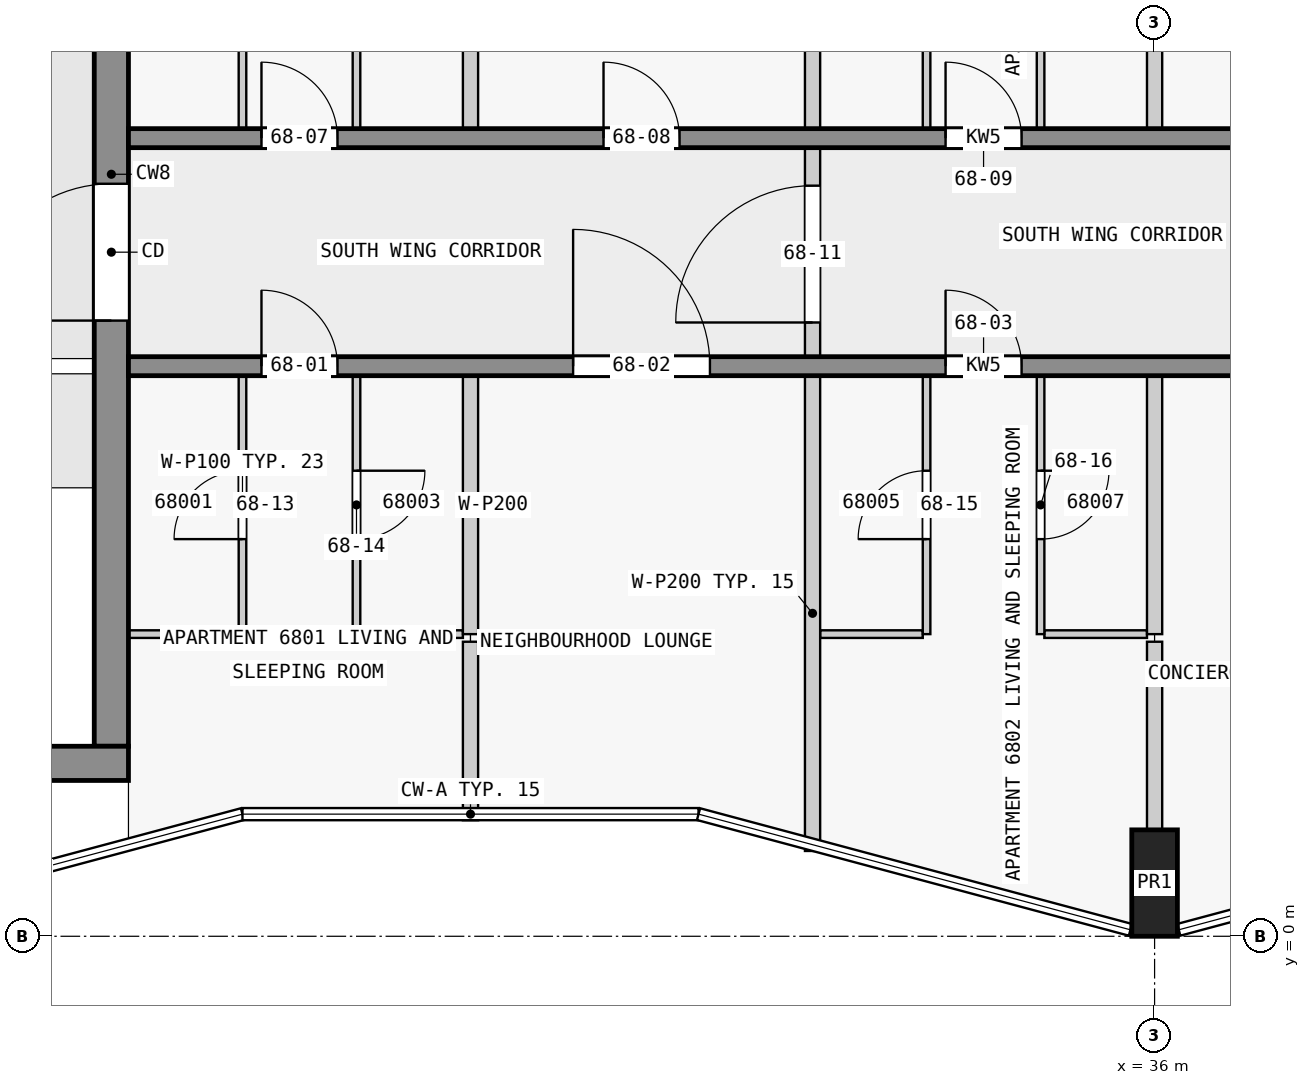
"""IFC4 building model, lengths in metres.
Left out: names, types, materials, properties, quantities, classifications, styles, units other than length and angle.
Written with IfcOpenShell. Run it as: python <this file> out.ifc"""

import sys

from ifc_helpers import new_model, si_unit, direction, frame, frame_2d, origin, origin_2d, place, context, subcontext, project, spatial, rectangle, extrude, element, fill, save


model = new_model("IFC4")
c1 = context("Model", 3, precision=1e-05, world=origin(), true_north=direction((0.0, 1.0)))
c2 = subcontext(c1, "Body", "Model", "MODEL_VIEW")
j1 = project(units=[si_unit("LENGTHUNIT", "METRE"), si_unit("PLANEANGLEUNIT", "RADIAN")], contexts=[c1])
p1 = place(None, origin())
s1 = spatial("IfcSite", under=j1, at=p1, CompositionType="ELEMENT")
p2 = place(p1, origin())
s2 = spatial("IfcBuilding", under=s1, at=p2, CompositionType="ELEMENT")
p3 = place(p2, frame((0.0, 0.0, 259.9)))
s3 = spatial("IfcBuildingStorey", under=s2, at=p3, CompositionType="ELEMENT", Elevation=259.9)
p4 = place(p3, frame((36.0, 0.7, 0.0), z_axis=(0.0, 0.0, 1.0), x_axis=(1.0, 0.0, 0.0)))
e1 = element("IfcColumn", 1, at=p4, inside=s3, PredefinedType="COLUMN", context=c2, shape_type="SweptSolid", body=[
    extrude(rectangle(XDim=0.6, YDim=1.4, at=origin_2d()), origin(), (0.0, 0.0, 1.0), 3.5),
])
p5 = place(p3, frame((1.85, 2.275, 0.0), z_axis=(0.0, 0.0, 1.0), x_axis=(1.0, 0.0, 0.0)))
e2 = element("IfcWall", 2, at=p5, inside=s3, PredefinedType="SHEAR", context=c2, shape_type="SweptSolid", body=[
    extrude(rectangle(XDim=20.65, YDim=0.45, at=frame_2d((10.325, 0.0))), origin(), (0.0, 0.0, 1.0), 3.25),
])
p6 = place(p3, frame((22.275, 2.5, 0.0), z_axis=(0.0, 0.0, 1.0), x_axis=(0.0, 1.0, 0.0)))
e3 = element("IfcWall", 3, at=p6, inside=s3, PredefinedType="SHEAR", context=c2, shape_type="SweptSolid", body=[
    extrude(rectangle(XDim=15.05, YDim=0.45, at=frame_2d((7.525, 0.0))), origin(), (0.0, 0.0, 1.0), 3.25),
])
p7 = place(p6, frame((5.6, 0.0, 0.0)))
e4 = element("IfcOpeningElement", 4, at=p7, cuts=e3, PredefinedType="OPENING", context=c2, shape_type="SweptSolid", body=[
    extrude(rectangle(XDim=1.8, YDim=2.1, at=frame_2d((0.9, 1.05))), frame((0.0, 0.235, 0.0), z_axis=(0.0, -1.0, 0.0), x_axis=(1.0, 0.0, 0.0)), (0.0, 0.0, 1.0), 0.47),
])
p8 = place(p3, frame((22.5, 7.5, 0.0), z_axis=(0.0, 0.0, 1.0), x_axis=(1.0, 0.0, 0.0)))
e5 = element("IfcWall", 5, at=p8, inside=s3, PredefinedType="SHEAR", context=c2, shape_type="SweptSolid", body=[
    extrude(rectangle(XDim=22.5, YDim=0.25, at=frame_2d((11.25, 0.0))), origin(), (0.0, 0.0, 1.0), 3.25),
])
p9 = place(p8, frame((1.75, 0.0, 0.0)))
e6 = element("IfcOpeningElement", 6, at=p9, cuts=e5, PredefinedType="OPENING", context=c2, shape_type="SweptSolid", body=[
    extrude(rectangle(XDim=1.0, YDim=2.1, at=frame_2d((0.5, 1.05))), frame((0.0, 0.135, 0.0), z_axis=(0.0, -1.0, 0.0), x_axis=(1.0, 0.0, 0.0)), (0.0, 0.0, 1.0), 0.27),
])
p10 = place(p8, frame((5.85, 0.0, 0.0)))
e7 = element("IfcOpeningElement", 7, at=p10, cuts=e5, PredefinedType="OPENING", context=c2, shape_type="SweptSolid", body=[
    extrude(rectangle(XDim=1.8, YDim=2.1, at=frame_2d((0.9, 1.05))), frame((0.0, 0.135, 0.0), z_axis=(0.0, -1.0, 0.0), x_axis=(1.0, 0.0, 0.0)), (0.0, 0.0, 1.0), 0.27),
])
p11 = place(p8, frame((10.75, 0.0, 0.0)))
e8 = element("IfcOpeningElement", 8, at=p11, cuts=e5, PredefinedType="OPENING", context=c2, shape_type="SweptSolid", body=[
    extrude(rectangle(XDim=1.0, YDim=2.1, at=frame_2d((0.5, 1.05))), frame((0.0, 0.135, 0.0), z_axis=(0.0, -1.0, 0.0), x_axis=(1.0, 0.0, 0.0)), (0.0, 0.0, 1.0), 0.27),
])
p12 = place(p8, frame((15.25, 0.0, 0.0)))
e9 = element("IfcOpeningElement", 9, at=p12, cuts=e5, PredefinedType="OPENING", context=c2, shape_type="SweptSolid", body=[
    extrude(rectangle(XDim=1.0, YDim=2.1, at=frame_2d((0.5, 1.05))), frame((0.0, 0.135, 0.0), z_axis=(0.0, -1.0, 0.0), x_axis=(1.0, 0.0, 0.0)), (0.0, 0.0, 1.0), 0.27),
])
p13 = place(p8, frame((18.75, 0.0, 0.0)))
e10 = element("IfcOpeningElement", 10, at=p13, cuts=e5, PredefinedType="OPENING", context=c2, shape_type="SweptSolid", body=[
    extrude(rectangle(XDim=0.9, YDim=2.1, at=frame_2d((0.45, 1.05))), frame((0.0, 0.135, 0.0), z_axis=(0.0, -1.0, 0.0), x_axis=(1.0, 0.0, 0.0)), (0.0, 0.0, 1.0), 0.27),
])
p14 = place(p8, frame((20.95, 0.0, 0.0)))
e11 = element("IfcOpeningElement", 11, at=p14, cuts=e5, PredefinedType="OPENING", context=c2, shape_type="SweptSolid", body=[
    extrude(rectangle(XDim=1.0, YDim=2.1, at=frame_2d((0.5, 1.05))), frame((0.0, 0.135, 0.0), z_axis=(0.0, -1.0, 0.0), x_axis=(1.0, 0.0, 0.0)), (0.0, 0.0, 1.0), 0.27),
])
p15 = place(p3, frame((22.5, 10.5, 0.0), z_axis=(0.0, 0.0, 1.0), x_axis=(1.0, 0.0, 0.0)))
e12 = element("IfcWall", 12, at=p15, inside=s3, PredefinedType="SHEAR", context=c2, shape_type="SweptSolid", body=[
    extrude(rectangle(XDim=22.5, YDim=0.25, at=frame_2d((11.25, 0.0))), origin(), (0.0, 0.0, 1.0), 3.25),
])
p16 = place(p15, frame((1.75, 0.0, 0.0)))
e13 = element("IfcOpeningElement", 13, at=p16, cuts=e12, PredefinedType="OPENING", context=c2, shape_type="SweptSolid", body=[
    extrude(rectangle(XDim=1.0, YDim=2.1, at=frame_2d((0.5, 1.05))), frame((0.0, 0.135, 0.0), z_axis=(0.0, -1.0, 0.0), x_axis=(1.0, 0.0, 0.0)), (0.0, 0.0, 1.0), 0.27),
])
p17 = place(p15, frame((6.25, 0.0, 0.0)))
e14 = element("IfcOpeningElement", 14, at=p17, cuts=e12, PredefinedType="OPENING", context=c2, shape_type="SweptSolid", body=[
    extrude(rectangle(XDim=1.0, YDim=2.1, at=frame_2d((0.5, 1.05))), frame((0.0, 0.135, 0.0), z_axis=(0.0, -1.0, 0.0), x_axis=(1.0, 0.0, 0.0)), (0.0, 0.0, 1.0), 0.27),
])
p18 = place(p15, frame((10.75, 0.0, 0.0)))
e15 = element("IfcOpeningElement", 15, at=p18, cuts=e12, PredefinedType="OPENING", context=c2, shape_type="SweptSolid", body=[
    extrude(rectangle(XDim=1.0, YDim=2.1, at=frame_2d((0.5, 1.05))), frame((0.0, 0.135, 0.0), z_axis=(0.0, -1.0, 0.0), x_axis=(1.0, 0.0, 0.0)), (0.0, 0.0, 1.0), 0.27),
])
p19 = place(p15, frame((16.85, 0.0, 0.0)))
e16 = element("IfcOpeningElement", 16, at=p19, cuts=e12, PredefinedType="OPENING", context=c2, shape_type="SweptSolid", body=[
    extrude(rectangle(XDim=1.0, YDim=2.1, at=frame_2d((0.5, 1.05))), frame((0.0, 0.135, 0.0), z_axis=(0.0, -1.0, 0.0), x_axis=(1.0, 0.0, 0.0)), (0.0, 0.0, 1.0), 0.27),
])
p20 = place(p3, frame((22.5, 3.975, 0.0), z_axis=(0.0, 0.0, 1.0), x_axis=(1.0, 0.0, 0.0)))
e17 = element("IfcWall", 17, at=p20, inside=s3, PredefinedType="PARTITIONING", context=c2, shape_type="SweptSolid", body=[
    extrude(rectangle(XDim=1.45, YDim=0.1, at=frame_2d((0.725, 0.0))), origin(), (0.0, 0.0, 1.0), 3.25),
])
for number, where, z_axis, x_axis in (
    (18, (25.55, 3.975, 0.0), (0.0, 0.0, 1.0), (1.0, 0.0, 0.0)),
    (19, (31.6, 3.975, 0.0), (0.0, 0.0, 1.0), (1.0, 0.0, 0.0)),
    (20, (34.55, 3.975, 0.0), (0.0, 0.0, 1.0), (1.0, 0.0, 0.0)),
):
    element("IfcWall", number, at=place(p3, frame(where, z_axis=z_axis, x_axis=x_axis)), inside=s3, PredefinedType="PARTITIONING", context=c2, shape_type="SweptSolid", body=[
        extrude(rectangle(XDim=1.35, YDim=0.1, at=frame_2d((0.675, 0.0))), origin(), (0.0, 0.0, 1.0), 3.25),
    ])
p21 = place(p3, frame((24.0, 3.975, 0.0), z_axis=(0.0, 0.0, 1.0), x_axis=(0.0, 1.0, 0.0)))
e21 = element("IfcWall", 21, at=p21, inside=s3, PredefinedType="PARTITIONING", context=c2, shape_type="SweptSolid", body=[
    extrude(rectangle(XDim=3.4, YDim=0.1, at=frame_2d((1.7, 0.0))), origin(), (0.0, 0.0, 1.0), 3.25),
])
p22 = place(p21, frame((1.25, 0.0, 0.0)))
e22 = element("IfcOpeningElement", 22, at=p22, cuts=e21, PredefinedType="OPENING", context=c2, shape_type="SweptSolid", body=[
    extrude(rectangle(XDim=0.9, YDim=2.1, at=frame_2d((0.45, 1.05))), frame((0.0, 0.06, 0.0), z_axis=(0.0, -1.0, 0.0), x_axis=(1.0, 0.0, 0.0)), (0.0, 0.0, 1.0), 0.12),
])
p23 = place(p3, frame((24.0, 10.625, 0.0), z_axis=(0.0, 0.0, 1.0), x_axis=(0.0, 1.0, 0.0)))
e23 = element("IfcWall", 23, at=p23, inside=s3, PredefinedType="PARTITIONING", context=c2, shape_type="SweptSolid", body=[
    extrude(rectangle(XDim=3.4, YDim=0.1, at=frame_2d((1.7, 0.0))), origin(), (0.0, 0.0, 1.0), 3.25),
])
p24 = place(p23, frame((1.25, 0.0, 0.0)))
e24 = element("IfcOpeningElement", 24, at=p24, cuts=e23, PredefinedType="OPENING", context=c2, shape_type="SweptSolid", body=[
    extrude(rectangle(XDim=0.9, YDim=2.1, at=frame_2d((0.45, 1.05))), frame((0.0, 0.06, 0.0), z_axis=(0.0, -1.0, 0.0), x_axis=(1.0, 0.0, 0.0)), (0.0, 0.0, 1.0), 0.12),
])
p25 = place(p3, frame((25.5, 7.375, 0.0), z_axis=(0.0, 0.0, 1.0), x_axis=(0.0, -1.0, 0.0)))
e25 = element("IfcWall", 25, at=p25, inside=s3, PredefinedType="PARTITIONING", context=c2, shape_type="SweptSolid", body=[
    extrude(rectangle(XDim=3.4, YDim=0.1, at=frame_2d((1.7, 0.0))), origin(), (0.0, 0.0, 1.0), 3.25),
])
p26 = place(p25, frame((1.25, 0.0, 0.0)))
e26 = element("IfcOpeningElement", 26, at=p26, cuts=e25, PredefinedType="OPENING", context=c2, shape_type="SweptSolid", body=[
    extrude(rectangle(XDim=0.9, YDim=2.1, at=frame_2d((0.45, 1.05))), frame((0.0, 0.06, 0.0), z_axis=(0.0, -1.0, 0.0), x_axis=(1.0, 0.0, 0.0)), (0.0, 0.0, 1.0), 0.12),
])
p27 = place(p3, frame((25.5, 14.025, 0.0), z_axis=(0.0, 0.0, 1.0), x_axis=(0.0, -1.0, 0.0)))
e27 = element("IfcWall", 27, at=p27, inside=s3, PredefinedType="PARTITIONING", context=c2, shape_type="SweptSolid", body=[
    extrude(rectangle(XDim=3.4, YDim=0.1, at=frame_2d((1.7, 0.0))), origin(), (0.0, 0.0, 1.0), 3.25),
])
p28 = place(p27, frame((1.25, 0.0, 0.0)))
e28 = element("IfcOpeningElement", 28, at=p28, cuts=e27, PredefinedType="OPENING", context=c2, shape_type="SweptSolid", body=[
    extrude(rectangle(XDim=0.9, YDim=2.1, at=frame_2d((0.45, 1.05))), frame((0.0, 0.06, 0.0), z_axis=(0.0, -1.0, 0.0), x_axis=(1.0, 0.0, 0.0)), (0.0, 0.0, 1.0), 0.12),
])
p29 = place(p3, frame((27.0, 3.875, 0.0), z_axis=(0.0, 0.0, 1.0), x_axis=(0.0, -1.0, 0.0)))
e29 = element("IfcWall", 29, at=p29, inside=s3, PredefinedType="PARTITIONING", context=c2, shape_type="SweptSolid", body=[
    extrude(rectangle(XDim=2.348, YDim=0.2, at=frame_2d((1.174, 0.0))), origin(), (0.0, 0.0, 1.0), 3.25),
])
for number, where, z_axis, x_axis in (
    (30, (27.0, 3.975, 0.0), (0.0, 0.0, 1.0), (0.0, 1.0, 0.0)),
    (31, (27.0, 10.625, 0.0), (0.0, 0.0, 1.0), (0.0, 1.0, 0.0)),
):
    element("IfcWall", number, at=place(p3, frame(where, z_axis=z_axis, x_axis=x_axis)), inside=s3, PredefinedType="PARTITIONING", context=c2, shape_type="SweptSolid", body=[
        extrude(rectangle(XDim=3.4, YDim=0.2, at=frame_2d((1.7, 0.0))), origin(), (0.0, 0.0, 1.0), 3.25),
    ])
for number, where, z_axis, x_axis in (
    (32, (31.5, 1.122, 0.0), (0.0, 0.0, 1.0), (0.0, 1.0, 0.0)),
    (33, (31.5, 10.625, 0.0), (0.0, 0.0, 1.0), (0.0, 1.0, 0.0)),
):
    element("IfcWall", number, at=place(p3, frame(where, z_axis=z_axis, x_axis=x_axis)), inside=s3, PredefinedType="PARTITIONING", context=c2, shape_type="SweptSolid", body=[
        extrude(rectangle(XDim=6.253, YDim=0.2, at=frame_2d((3.126, 0.0))), origin(), (0.0, 0.0, 1.0), 3.25),
    ])
p30 = place(p3, frame((33.0, 3.975, 0.0), z_axis=(0.0, 0.0, 1.0), x_axis=(0.0, 1.0, 0.0)))
e34 = element("IfcWall", 34, at=p30, inside=s3, PredefinedType="PARTITIONING", context=c2, shape_type="SweptSolid", body=[
    extrude(rectangle(XDim=3.4, YDim=0.1, at=frame_2d((1.7, 0.0))), origin(), (0.0, 0.0, 1.0), 3.25),
])
p31 = place(p30, frame((1.25, 0.0, 0.0)))
e35 = element("IfcOpeningElement", 35, at=p31, cuts=e34, PredefinedType="OPENING", context=c2, shape_type="SweptSolid", body=[
    extrude(rectangle(XDim=0.9, YDim=2.1, at=frame_2d((0.45, 1.05))), frame((0.0, 0.06, 0.0), z_axis=(0.0, -1.0, 0.0), x_axis=(1.0, 0.0, 0.0)), (0.0, 0.0, 1.0), 0.12),
])
p32 = place(p3, frame((33.0, 10.625, 0.0), z_axis=(0.0, 0.0, 1.0), x_axis=(0.0, 1.0, 0.0)))
e36 = element("IfcWall", 36, at=p32, inside=s3, PredefinedType="PARTITIONING", context=c2, shape_type="SweptSolid", body=[
    extrude(rectangle(XDim=3.4, YDim=0.1, at=frame_2d((1.7, 0.0))), origin(), (0.0, 0.0, 1.0), 3.25),
])
p33 = place(p32, frame((1.25, 0.0, 0.0)))
e37 = element("IfcOpeningElement", 37, at=p33, cuts=e36, PredefinedType="OPENING", context=c2, shape_type="SweptSolid", body=[
    extrude(rectangle(XDim=0.9, YDim=2.1, at=frame_2d((0.45, 1.05))), frame((0.0, 0.06, 0.0), z_axis=(0.0, -1.0, 0.0), x_axis=(1.0, 0.0, 0.0)), (0.0, 0.0, 1.0), 0.12),
])
p34 = place(p3, frame((34.5, 7.375, 0.0), z_axis=(0.0, 0.0, 1.0), x_axis=(0.0, -1.0, 0.0)))
e38 = element("IfcWall", 38, at=p34, inside=s3, PredefinedType="PARTITIONING", context=c2, shape_type="SweptSolid", body=[
    extrude(rectangle(XDim=3.4, YDim=0.1, at=frame_2d((1.7, 0.0))), origin(), (0.0, 0.0, 1.0), 3.25),
])
p35 = place(p34, frame((1.25, 0.0, 0.0)))
e39 = element("IfcOpeningElement", 39, at=p35, cuts=e38, PredefinedType="OPENING", context=c2, shape_type="SweptSolid", body=[
    extrude(rectangle(XDim=0.9, YDim=2.1, at=frame_2d((0.45, 1.05))), frame((0.0, 0.06, 0.0), z_axis=(0.0, -1.0, 0.0), x_axis=(1.0, 0.0, 0.0)), (0.0, 0.0, 1.0), 0.12),
])
p36 = place(p3, frame((34.5, 13.975, 0.0), z_axis=(0.0, 0.0, 1.0), x_axis=(0.0, -1.0, 0.0)))
e40 = element("IfcWall", 40, at=p36, inside=s3, PredefinedType="PARTITIONING", context=c2, shape_type="SweptSolid", body=[
    extrude(rectangle(XDim=3.35, YDim=0.1, at=frame_2d((1.675, 0.0))), origin(), (0.0, 0.0, 1.0), 3.25),
])
p37 = place(p36, frame((1.25, 0.0, 0.0)))
e41 = element("IfcOpeningElement", 41, at=p37, cuts=e40, PredefinedType="OPENING", context=c2, shape_type="SweptSolid", body=[
    extrude(rectangle(XDim=0.9, YDim=2.1, at=frame_2d((0.45, 1.05))), frame((0.0, 0.06, 0.0), z_axis=(0.0, -1.0, 0.0), x_axis=(1.0, 0.0, 0.0)), (0.0, 0.0, 1.0), 0.12),
])
p38 = place(p3, frame((36.0, 3.875, 0.0), z_axis=(0.0, 0.0, 1.0), x_axis=(0.0, -1.0, 0.0)))
e42 = element("IfcWall", 42, at=p38, inside=s3, PredefinedType="PARTITIONING", context=c2, shape_type="SweptSolid", body=[
    extrude(rectangle(XDim=2.475, YDim=0.2, at=frame_2d((1.238, 0.0))), origin(), (0.0, 0.0, 1.0), 3.25),
])
for number, where, z_axis, x_axis in (
    (43, (36.0, 3.975, 0.0), (0.0, 0.0, 1.0), (0.0, 1.0, 0.0)),
    (44, (36.0, 10.625, 0.0), (0.0, 0.0, 1.0), (0.0, 1.0, 0.0)),
):
    element("IfcWall", number, at=place(p3, frame(where, z_axis=z_axis, x_axis=x_axis)), inside=s3, PredefinedType="PARTITIONING", context=c2, shape_type="SweptSolid", body=[
        extrude(rectangle(XDim=3.4, YDim=0.2, at=frame_2d((1.7, 0.0))), origin(), (0.0, 0.0, 1.0), 3.25),
    ])
p39 = place(p3, frame((31.5, 7.475, 0.0), z_axis=(0.0, 0.0, 1.0), x_axis=(0.0, 1.0, 0.0)))
e45 = element("IfcWall", 45, at=p39, inside=s3, PredefinedType="PARTITIONING", context=c2, shape_type="SweptSolid", body=[
    extrude(rectangle(XDim=3.05, YDim=0.2, at=frame_2d((1.525, 0.0))), origin(), (0.0, 0.0, 1.0), 3.25),
])
p40 = place(p39, frame((0.6, 0.0, 0.0)))
e46 = element("IfcOpeningElement", 46, at=p40, cuts=e45, PredefinedType="OPENING", context=c2, shape_type="SweptSolid", body=[
    extrude(rectangle(XDim=1.8, YDim=2.1, at=frame_2d((0.9, 1.05))), frame((0.0, 0.11, 0.0), z_axis=(0.0, -1.0, 0.0), x_axis=(1.0, 0.0, 0.0)), (0.0, 0.0, 1.0), 0.22),
])
p41 = place(p7, origin())
e47 = element("IfcDoor", 47, at=p41, inside=s3, OperationType="DOUBLE_DOOR_SINGLE_SWING", PredefinedType="DOOR", context=c2, shape_type="SweptSolid", body=[
    extrude(rectangle(XDim=1.8, YDim=2.1, at=frame_2d((0.9, 1.05))), frame((0.0, 0.025, 0.0), z_axis=(0.0, -1.0, 0.0), x_axis=(1.0, 0.0, 0.0)), (0.0, 0.0, 1.0), 0.05),
])
fill(e4, e47)
p42 = place(p9, origin())
e48 = element("IfcDoor", 48, at=p42, inside=s3, OperationType="SINGLE_SWING_LEFT", PredefinedType="DOOR", context=c2, shape_type="SweptSolid", body=[
    extrude(rectangle(XDim=1.0, YDim=2.1, at=frame_2d((0.5, 1.05))), frame((0.0, 0.025, 0.0), z_axis=(0.0, -1.0, 0.0), x_axis=(1.0, 0.0, 0.0)), (0.0, 0.0, 1.0), 0.05),
])
fill(e6, e48)
p43 = place(p10, origin())
e49 = element("IfcDoor", 49, at=p43, inside=s3, OperationType="SINGLE_SWING_LEFT", PredefinedType="DOOR", context=c2, shape_type="SweptSolid", body=[
    extrude(rectangle(XDim=1.8, YDim=2.1, at=frame_2d((0.9, 1.05))), frame((0.0, 0.025, 0.0), z_axis=(0.0, -1.0, 0.0), x_axis=(1.0, 0.0, 0.0)), (0.0, 0.0, 1.0), 0.05),
])
fill(e7, e49)
p44 = place(p11, origin())
e50 = element("IfcDoor", 50, at=p44, inside=s3, OperationType="SINGLE_SWING_LEFT", PredefinedType="DOOR", context=c2, shape_type="SweptSolid", body=[
    extrude(rectangle(XDim=1.0, YDim=2.1, at=frame_2d((0.5, 1.05))), frame((0.0, 0.025, 0.0), z_axis=(0.0, -1.0, 0.0), x_axis=(1.0, 0.0, 0.0)), (0.0, 0.0, 1.0), 0.05),
])
fill(e8, e50)
p45 = place(p16, origin())
e51 = element("IfcDoor", 51, at=p45, inside=s3, OperationType="SINGLE_SWING_LEFT", PredefinedType="DOOR", context=c2, shape_type="SweptSolid", body=[
    extrude(rectangle(XDim=1.0, YDim=2.1, at=frame_2d((0.5, 1.05))), frame((0.0, 0.025, 0.0), z_axis=(0.0, -1.0, 0.0), x_axis=(1.0, 0.0, 0.0)), (0.0, 0.0, 1.0), 0.05),
])
fill(e13, e51)
p46 = place(p17, origin())
e52 = element("IfcDoor", 52, at=p46, inside=s3, OperationType="SINGLE_SWING_LEFT", PredefinedType="DOOR", context=c2, shape_type="SweptSolid", body=[
    extrude(rectangle(XDim=1.0, YDim=2.1, at=frame_2d((0.5, 1.05))), frame((0.0, 0.025, 0.0), z_axis=(0.0, -1.0, 0.0), x_axis=(1.0, 0.0, 0.0)), (0.0, 0.0, 1.0), 0.05),
])
fill(e14, e52)
p47 = place(p18, origin())
e53 = element("IfcDoor", 53, at=p47, inside=s3, OperationType="SINGLE_SWING_LEFT", PredefinedType="DOOR", context=c2, shape_type="SweptSolid", body=[
    extrude(rectangle(XDim=1.0, YDim=2.1, at=frame_2d((0.5, 1.05))), frame((0.0, 0.025, 0.0), z_axis=(0.0, -1.0, 0.0), x_axis=(1.0, 0.0, 0.0)), (0.0, 0.0, 1.0), 0.05),
])
fill(e15, e53)
p48 = place(p40, origin())
e54 = element("IfcDoor", 54, at=p48, inside=s3, OperationType="SINGLE_SWING_LEFT", PredefinedType="DOOR", context=c2, shape_type="SweptSolid", body=[
    extrude(rectangle(XDim=1.8, YDim=2.1, at=frame_2d((0.9, 1.05))), frame((0.0, 0.025, 0.0), z_axis=(0.0, -1.0, 0.0), x_axis=(1.0, 0.0, 0.0)), (0.0, 0.0, 1.0), 0.05),
])
fill(e46, e54)
p49 = place(p22, origin())
e55 = element("IfcDoor", 55, at=p49, inside=s3, OperationType="SINGLE_SWING_LEFT", PredefinedType="DOOR", context=c2, shape_type="SweptSolid", body=[
    extrude(rectangle(XDim=0.9, YDim=2.1, at=frame_2d((0.45, 1.05))), frame((0.0, 0.025, 0.0), z_axis=(0.0, -1.0, 0.0), x_axis=(1.0, 0.0, 0.0)), (0.0, 0.0, 1.0), 0.05),
])
fill(e22, e55)
p50 = place(p26, origin())
e56 = element("IfcDoor", 56, at=p50, inside=s3, OperationType="SINGLE_SWING_LEFT", PredefinedType="DOOR", context=c2, shape_type="SweptSolid", body=[
    extrude(rectangle(XDim=0.9, YDim=2.1, at=frame_2d((0.45, 1.05))), frame((0.0, 0.025, 0.0), z_axis=(0.0, -1.0, 0.0), x_axis=(1.0, 0.0, 0.0)), (0.0, 0.0, 1.0), 0.05),
])
fill(e26, e56)
p51 = place(p31, origin())
e57 = element("IfcDoor", 57, at=p51, inside=s3, OperationType="SINGLE_SWING_LEFT", PredefinedType="DOOR", context=c2, shape_type="SweptSolid", body=[
    extrude(rectangle(XDim=0.9, YDim=2.1, at=frame_2d((0.45, 1.05))), frame((0.0, 0.025, 0.0), z_axis=(0.0, -1.0, 0.0), x_axis=(1.0, 0.0, 0.0)), (0.0, 0.0, 1.0), 0.05),
])
fill(e35, e57)
p52 = place(p35, origin())
e58 = element("IfcDoor", 58, at=p52, inside=s3, OperationType="SINGLE_SWING_LEFT", PredefinedType="DOOR", context=c2, shape_type="SweptSolid", body=[
    extrude(rectangle(XDim=0.9, YDim=2.1, at=frame_2d((0.45, 1.05))), frame((0.0, 0.025, 0.0), z_axis=(0.0, -1.0, 0.0), x_axis=(1.0, 0.0, 0.0)), (0.0, 0.0, 1.0), 0.05),
])
fill(e39, e58)
save(model, sys.argv[1])
